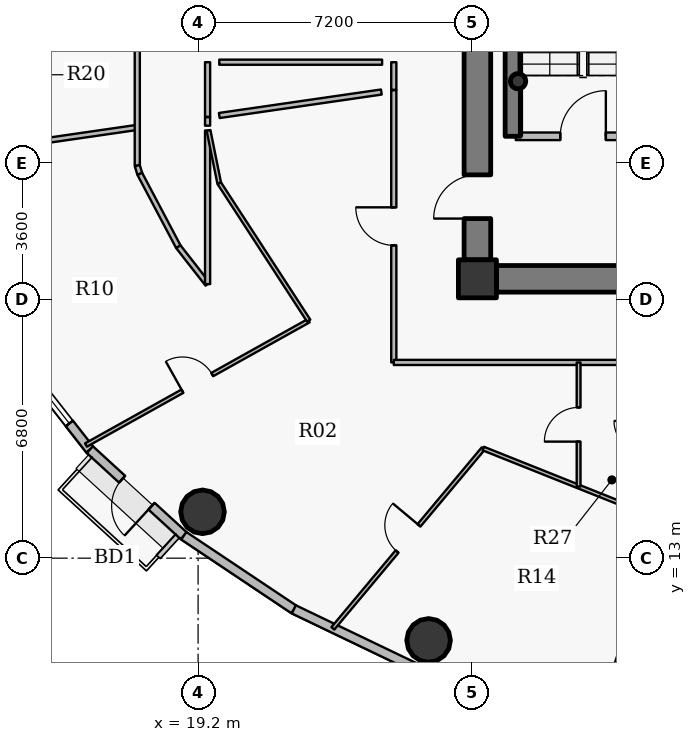
"""IFC4 building model, lengths in metres.
Left out: names, types, materials, properties, quantities, classifications, styles, units other than length and angle.
Written with IfcOpenShell. Run it as: python <this file> out.ifc"""

import sys

from ifc_helpers import new_model, si_unit, direction, frame, frame_2d, origin, origin_2d, place, context, subcontext, project, spatial, rectangle, hollow_circle, extrude, source, transform, mapped, element, fill, save


model = new_model("IFC4")
c1 = context("Model", 3, precision=1e-05, world=origin(), true_north=direction((0.0, 1.0)))
c2 = subcontext(c1, "Body", "Model", "MODEL_VIEW")
j1 = project(units=[si_unit("LENGTHUNIT", "METRE"), si_unit("PLANEANGLEUNIT", "RADIAN")], contexts=[c1])
p1 = place(None, origin())
s1 = spatial("IfcSite", under=j1, at=p1, CompositionType="ELEMENT")
p2 = place(p1, origin())
s2 = spatial("IfcBuilding", under=s1, at=p2, CompositionType="ELEMENT")
p3 = place(p2, frame((0.0, 0.0, 240.3)))
s3 = spatial("IfcBuildingStorey", under=s2, at=p3, CompositionType="ELEMENT", Elevation=240.3)
p4 = place(p3, frame((26.55, 20.35, 0.0), z_axis=(0.0, 0.0, 1.0), x_axis=(1.0, 0.0, 0.0)))
e1 = element("IfcColumn", 1, at=p4, inside=s3, PredefinedType="COLUMN", context=c2, shape_type="SweptSolid", body=[
    extrude(rectangle(XDim=1.0, YDim=1.0, at=origin_2d()), origin(), (0.0, 0.0, 1.0), 3.75),
])
p5 = place(p3, frame((27.48, 24.1, 0.0), z_axis=(0.0, 0.0, 1.0), x_axis=(0.0, 1.0, 0.0)))
e2 = element("IfcWall", 2, at=p5, inside=s3, PredefinedType="SHEAR", context=c2, shape_type="SweptSolid", body=[
    extrude(rectangle(XDim=8.6, YDim=0.4, at=frame_2d((4.3, 0.0))), origin(), (0.0, 0.0, 1.0), 3.75),
])
p6 = place(p3, frame((27.62, 25.55, 0.0), z_axis=(0.0, 0.0, 1.0), x_axis=(1.0, 0.0, 0.0)))
e3 = element("IfcColumn", 3, at=p6, inside=s3, PredefinedType="COLUMN", context=c2, shape_type="SweptSolid", body=[
    extrude(hollow_circle(Radius=0.203, WallThickness=0.016, at=origin_2d()), origin(), (0.0, 0.0, 1.0), 3.75),
])
p7 = place(p3, frame((44.95, 20.35, 0.0), z_axis=(0.0, 0.0, 1.0), x_axis=(-1.0, 0.0, 0.0)))
e4 = element("IfcWall", 4, at=p7, inside=s3, PredefinedType="SHEAR", context=c2, shape_type="SweptSolid", body=[
    extrude(rectangle(XDim=17.9, YDim=0.7, at=frame_2d((8.95, 0.0))), origin(), (0.0, 0.0, 1.0), 3.05),
])
p8 = place(p7, frame((9.7, 0.0, 0.0)))
e5 = element("IfcOpeningElement", 5, at=p8, cuts=e4, PredefinedType="OPENING", context=c2, shape_type="SweptSolid", body=[
    extrude(rectangle(XDim=1.15, YDim=2.15, at=origin_2d()), frame((0.575, 0.36, 1.075), z_axis=(0.0, -1.0, 0.0), x_axis=(1.0, 0.0, 0.0)), (0.0, 0.0, 1.0), 0.72),
])
p9 = place(p3, frame((26.55, 20.85, 0.0), z_axis=(0.0, 0.0, 1.0), x_axis=(0.0, 1.0, 0.0)))
e6 = element("IfcWall", 6, at=p9, inside=s3, PredefinedType="SHEAR", context=c2, shape_type="SweptSolid", body=[
    extrude(rectangle(XDim=12.3, YDim=0.7, at=frame_2d((6.15, 0.0))), origin(), (0.0, 0.0, 1.0), 3.05),
])
p10 = place(p9, frame((1.085, 0.0, 0.0)))
e7 = element("IfcOpeningElement", 7, at=p10, cuts=e6, PredefinedType="OPENING", context=c2, shape_type="SweptSolid", body=[
    extrude(rectangle(XDim=1.15, YDim=2.15, at=origin_2d()), frame((0.575, 0.36, 1.075), z_axis=(0.0, -1.0, 0.0), x_axis=(1.0, 0.0, 0.0)), (0.0, 0.0, 1.0), 0.72),
])
for number, where, z_axis, x_axis in (
    (8, (19.317, 14.219, 0.0), (0.0, 0.0, 1.0), (1.0, 0.0, 0.0)),
    (9, (25.265, 10.836, 0.0), (0.0, 0.0, 1.0), (1.0, 0.0, 0.0)),
):
    element("IfcColumn", number, at=place(p3, frame(where, z_axis=z_axis, x_axis=x_axis)), inside=s3, PredefinedType="COLUMN", context=c2, shape_type="SweptSolid", body=[
        extrude(hollow_circle(Radius=0.575, WallThickness=0.036, at=origin_2d()), origin(), (0.0, 0.0, 1.0), 3.75),
    ])
p11 = place(p3, frame((16.352, 15.855, 0.0), z_axis=(0.0, 0.0, 1.0), x_axis=(-0.616312344705, 0.787501805562, 0.0)))
e10 = element("IfcWall", 10, at=p11, inside=s3, PredefinedType="SOLIDWALL", context=c2, shape_type="SweptSolid", body=[
    extrude(rectangle(XDim=3.225, YDim=0.24, at=frame_2d((1.612, 0.0))), origin(), (0.0, 0.0, 1.0), 3.5),
])
p12 = place(p11, frame((0.876, 0.0, 0.9)))
e11 = element("IfcOpeningElement", 11, at=p12, cuts=e10, PredefinedType="OPENING", context=c2, shape_type="SweptSolid", body=[
    extrude(rectangle(XDim=1.6, YDim=1.75, at=origin_2d()), frame((0.8, 0.13, 0.875), z_axis=(0.0, -1.0, 0.0), x_axis=(1.0, 0.0, 0.0)), (0.0, 0.0, 1.0), 0.26),
])
p13 = place(p3, frame((18.824, 13.589, 0.0), z_axis=(0.0, 0.0, 1.0), x_axis=(-0.737123922599, 0.675757591694, 0.0)))
e12 = element("IfcWall", 12, at=p13, inside=s3, PredefinedType="SOLIDWALL", context=c2, shape_type="SweptSolid", body=[
    extrude(rectangle(XDim=3.354, YDim=0.24, at=frame_2d((1.677, 0.0))), origin(), (0.0, 0.0, 1.0), 3.5),
])
p14 = place(p13, frame((1.152, 0.0, 0.0)))
e13 = element("IfcOpeningElement", 13, at=p14, cuts=e12, PredefinedType="OPENING", context=c2, shape_type="SweptSolid", body=[
    extrude(rectangle(XDim=1.05, YDim=2.15, at=origin_2d()), frame((0.525, 0.13, 1.075), z_axis=(0.0, -1.0, 0.0), x_axis=(1.0, 0.0, 0.0)), (0.0, 0.0, 1.0), 0.26),
])
p15 = place(p3, frame((21.72, 11.652, 0.0), z_axis=(0.0, 0.0, 1.0), x_axis=(-0.831262496074, 0.555880079352, 0.0)))
e14 = element("IfcWall", 14, at=p15, inside=s3, PredefinedType="SOLIDWALL", context=c2, shape_type="SweptSolid", body=[
    extrude(rectangle(XDim=3.484, YDim=0.24, at=frame_2d((1.742, 0.0))), origin(), (0.0, 0.0, 1.0), 3.5),
])
p16 = place(p3, frame((24.969, 10.094, 0.0), z_axis=(0.0, 0.0, 1.0), x_axis=(-0.901598104751, 0.432574684313, 0.0)))
e15 = element("IfcWall", 15, at=p16, inside=s3, PredefinedType="SOLIDWALL", context=c2, shape_type="SweptSolid", body=[
    extrude(rectangle(XDim=3.604, YDim=0.24, at=frame_2d((1.802, 0.0))), origin(), (0.0, 0.0, 1.0), 3.5),
])
p17 = place(p3, frame((12.167, 23.548, 0.0), z_axis=(0.0, 0.0, 1.0), x_axis=(0.989672764262, 0.143345106921, 0.0)))
e16 = element("IfcWall", 16, at=p17, inside=s3, PredefinedType="PARTITIONING", context=c2, shape_type="SweptSolid", body=[
    extrude(rectangle(XDim=5.489, YDim=0.135, at=frame_2d((2.745, 0.0))), origin(), (0.0, 0.0, 1.0), 2.985),
])
p18 = place(p3, frame((16.25, 15.977, 0.0), z_axis=(0.0, 0.0, 1.0), x_axis=(0.87319302211, 0.487374543999, 0.0)))
e17 = element("IfcWall", 17, at=p18, inside=s3, PredefinedType="PARTITIONING", context=c2, shape_type="SweptSolid", body=[
    extrude(rectangle(XDim=6.712, YDim=0.1, at=frame_2d((3.356, 0.0))), origin(), (0.0, 0.0, 1.0), 2.985),
])
p19 = place(p18, frame((2.906, 0.0, 0.0)))
e18 = element("IfcOpeningElement", 18, at=p19, cuts=e17, PredefinedType="OPENING", context=c2, shape_type="SweptSolid", body=[
    extrude(rectangle(XDim=0.9, YDim=2.1, at=origin_2d()), frame((0.45, 0.06, 1.05), z_axis=(0.0, -1.0, 0.0), x_axis=(1.0, 0.0, 0.0)), (0.0, 0.0, 1.0), 0.12),
])
p20 = place(p3, frame((17.6, 23.328, 0.0), z_axis=(0.0, 0.0, 1.0), x_axis=(0.0, 1.0, 0.0)))
e19 = element("IfcWall", 19, at=p20, inside=s3, PredefinedType="PARTITIONING", context=c2, shape_type="SweptSolid", body=[
    extrude(rectangle(XDim=4.622, YDim=0.135, at=frame_2d((2.311, 0.0))), origin(), (0.0, 0.0, 1.0), 2.935),
])
p21 = place(p3, frame((17.6, 23.328, 0.0), z_axis=(0.0, 0.0, 1.0), x_axis=(0.292875000845, -0.956150738053, 0.0)))
e20 = element("IfcWall", 20, at=p21, inside=s3, PredefinedType="PARTITIONING", context=c2, shape_type="SweptSolid", body=[
    extrude(rectangle(XDim=0.227, YDim=0.135, at=frame_2d((0.113, 0.0))), origin(), (0.0, 0.0, 1.0), 3.5),
])
p22 = place(p3, frame((17.667, 23.111, 0.0), z_axis=(0.0, 0.0, 1.0), x_axis=(0.467675622269, -0.883900171024, 0.0)))
e21 = element("IfcWall", 21, at=p22, inside=s3, PredefinedType="PARTITIONING", context=c2, shape_type="SweptSolid", body=[
    extrude(rectangle(XDim=2.168, YDim=0.135, at=frame_2d((1.084, 0.0))), origin(), (0.0, 0.0, 1.0), 2.935),
])
p23 = place(p3, frame((18.681, 21.194, 0.0), z_axis=(0.0, 0.0, 1.0), x_axis=(0.616239706802, -0.787558647823, 0.0)))
e22 = element("IfcWall", 22, at=p23, inside=s3, PredefinedType="PARTITIONING", context=c2, shape_type="SweptSolid", body=[
    extrude(rectangle(XDim=1.248, YDim=0.135, at=frame_2d((0.624, 0.0))), origin(), (0.0, 0.0, 1.0), 3.5),
])
p24 = place(p3, frame((19.45, 20.211, 0.0), z_axis=(0.0, 0.0, 1.0), x_axis=(0.0, 1.0, 0.0)))
e23 = element("IfcWall", 23, at=p24, inside=s3, PredefinedType="PARTITIONING", context=c2, shape_type="SweptSolid", body=[
    extrude(rectangle(XDim=4.042, YDim=0.135, at=frame_2d((2.021, 0.0))), origin(), (0.0, 0.0, 1.0), 2.935),
])
p25 = place(p3, frame((19.45, 24.38, 0.0), z_axis=(0.0, 0.0, 1.0), x_axis=(0.0, 1.0, 0.0)))
e24 = element("IfcWall", 24, at=p25, inside=s3, PredefinedType="PARTITIONING", context=c2, shape_type="SweptSolid", body=[
    extrude(rectangle(XDim=0.223, YDim=0.135, at=frame_2d((0.111, 0.0))), origin(), (0.0, 0.0, 1.0), 3.5),
])
p26 = place(p3, frame((19.475, 24.256, 0.0), z_axis=(0.0, 0.0, 1.0), x_axis=(0.198203790622, -0.980160832406, 0.0)))
e25 = element("IfcWall", 25, at=p26, inside=s3, PredefinedType="PARTITIONING", context=c2, shape_type="SweptSolid", body=[
    extrude(rectangle(XDim=1.417, YDim=0.1, at=frame_2d((0.708, 0.0))), origin(), (0.0, 0.0, 1.0), 2.935),
])
p27 = place(p3, frame((19.756, 22.867, 0.0), z_axis=(0.0, 0.0, 1.0), x_axis=(0.545441385955, -0.83814896915, 0.0)))
e26 = element("IfcWall", 26, at=p27, inside=s3, PredefinedType="PARTITIONING", context=c2, shape_type="SweptSolid", body=[
    extrude(rectangle(XDim=4.318, YDim=0.1, at=frame_2d((2.159, 0.0))), origin(), (0.0, 0.0, 1.0), 2.935),
])
p28 = place(p3, frame((22.747, 11.154, 0.0), z_axis=(0.0, 0.0, 1.0), x_axis=(0.641565789242, 0.767068013982, 0.0)))
e27 = element("IfcWall", 27, at=p28, inside=s3, PredefinedType="PARTITIONING", context=c2, shape_type="SweptSolid", body=[
    extrude(rectangle(XDim=6.167, YDim=0.1, at=frame_2d((3.083, 0.0))), origin(), (0.0, 0.0, 1.0), 2.985),
])
p29 = place(p28, frame((2.633, 0.0, 0.0)))
e28 = element("IfcOpeningElement", 28, at=p29, cuts=e27, PredefinedType="OPENING", context=c2, shape_type="SweptSolid", body=[
    extrude(rectangle(XDim=0.9, YDim=2.1, at=origin_2d()), frame((0.45, 0.06, 1.05), z_axis=(0.0, -1.0, 0.0), x_axis=(1.0, 0.0, 0.0)), (0.0, 0.0, 1.0), 0.12),
])
p30 = place(p3, frame((24.35, 18.15, 0.0), z_axis=(0.0, 0.0, 1.0), x_axis=(0.0, 1.0, 0.0)))
e29 = element("IfcWall", 29, at=p30, inside=s3, PredefinedType="PARTITIONING", context=c2, shape_type="SweptSolid", body=[
    extrude(rectangle(XDim=7.163, YDim=0.135, at=frame_2d((3.581, 0.0))), origin(), (0.0, 0.0, 1.0), 2.935),
])
p31 = place(p30, frame((3.081, 0.0, 0.0)))
e30 = element("IfcOpeningElement", 30, at=p31, cuts=e29, PredefinedType="OPENING", context=c2, shape_type="SweptSolid", body=[
    extrude(rectangle(XDim=1.0, YDim=2.15, at=origin_2d()), frame((0.5, 0.078, 1.075), z_axis=(0.0, -1.0, 0.0), x_axis=(1.0, 0.0, 0.0)), (0.0, 0.0, 1.0), 0.155),
])
p32 = place(p3, frame((24.35, 18.15, 0.0), z_axis=(0.0, 0.0, 1.0), x_axis=(1.0, 0.0, 0.0)))
e31 = element("IfcWall", 31, at=p32, inside=s3, PredefinedType="PARTITIONING", context=c2, shape_type="SweptSolid", body=[
    extrude(rectangle(XDim=23.85, YDim=0.135, at=frame_2d((11.925, 0.0))), origin(), (0.0, 0.0, 1.0), 2.935),
])
p33 = place(p32, frame((14.838, 0.0, 0.0)))
e32 = element("IfcOpeningElement", 32, at=p33, cuts=e31, PredefinedType="OPENING", context=c2, shape_type="SweptSolid", body=[
    extrude(rectangle(XDim=1.0, YDim=2.15, at=origin_2d()), frame((0.5, 0.078, 1.075), z_axis=(0.0, -1.0, 0.0), x_axis=(1.0, 0.0, 0.0)), (0.0, 0.0, 1.0), 0.155),
])
p34 = place(p32, frame((21.472, 0.0, 0.0)))
e33 = element("IfcOpeningElement", 33, at=p34, cuts=e31, PredefinedType="OPENING", context=c2, shape_type="SweptSolid", body=[
    extrude(rectangle(XDim=1.0, YDim=2.15, at=origin_2d()), frame((0.5, 0.078, 1.075), z_axis=(0.0, -1.0, 0.0), x_axis=(1.0, 0.0, 0.0)), (0.0, 0.0, 1.0), 0.155),
])
p35 = place(p3, frame((26.703, 15.884, 0.0), z_axis=(0.0, 0.0, 1.0), x_axis=(0.928807108231, -0.370563564991, 0.0)))
e34 = element("IfcWall", 34, at=p35, inside=s3, PredefinedType="PARTITIONING", context=c2, shape_type="SweptSolid", body=[
    extrude(rectangle(XDim=4.327, YDim=0.1, at=frame_2d((2.163, 0.0))), origin(), (0.0, 0.0, 1.0), 2.935),
])
p36 = place(p3, frame((27.56, 24.1, 0.0), z_axis=(0.0, 0.0, 1.0), x_axis=(1.0, 0.0, 0.0)))
e35 = element("IfcWall", 35, at=p36, inside=s3, PredefinedType="PARTITIONING", context=c2, shape_type="SweptSolid", body=[
    extrude(rectangle(XDim=3.54, YDim=0.2, at=frame_2d((1.77, 0.0))), origin(), (0.0, 0.0, 1.0), 3.5),
])
p37 = place(p36, frame((1.17, 0.0, 0.0)))
e36 = element("IfcOpeningElement", 36, at=p37, cuts=e35, PredefinedType="OPENING", context=c2, shape_type="SweptSolid", body=[
    extrude(rectangle(XDim=1.2, YDim=2.15, at=origin_2d()), frame((0.6, 0.11, 1.075), z_axis=(0.0, -1.0, 0.0), x_axis=(1.0, 0.0, 0.0)), (0.0, 0.0, 1.0), 0.22),
])
p38 = place(p3, frame((29.213, 14.883, 0.0), z_axis=(0.0, 0.0, 1.0), x_axis=(0.0, 1.0, 0.0)))
e37 = element("IfcWall", 37, at=p38, inside=s3, PredefinedType="PARTITIONING", context=c2, shape_type="SweptSolid", body=[
    extrude(rectangle(XDim=3.267, YDim=0.1, at=frame_2d((1.633, 0.0))), origin(), (0.0, 0.0, 1.0), 2.935),
])
p39 = place(p38, frame((1.183, 0.0, 0.0)))
e38 = element("IfcOpeningElement", 38, at=p39, cuts=e37, PredefinedType="OPENING", context=c2, shape_type="SweptSolid", body=[
    extrude(rectangle(XDim=0.9, YDim=2.1, at=origin_2d()), frame((0.45, 0.06, 1.05), z_axis=(0.0, -1.0, 0.0), x_axis=(1.0, 0.0, 0.0)), (0.0, 0.0, 1.0), 0.12),
])
p40 = place(p3, frame((29.711, 8.717, 0.0), z_axis=(0.0, 0.0, 1.0), x_axis=(0.325280852175, 0.945617452889, 0.0)))
e39 = element("IfcWall", 39, at=p40, inside=s3, PredefinedType="PARTITIONING", context=c2, shape_type="SweptSolid", body=[
    extrude(rectangle(XDim=9.976, YDim=0.135, at=frame_2d((4.988, 0.0))), origin(), (0.0, 0.0, 1.0), 2.985),
])
p41 = place(p3, frame((19.45, 26.05, 0.0), z_axis=(0.0, 0.0, 1.0), x_axis=(0.0, -1.0, 0.0)))
e40 = element("IfcWall", 40, at=p41, inside=s3, PredefinedType="PARTITIONING", context=c2, shape_type="SweptSolid", body=[
    extrude(rectangle(XDim=1.437, YDim=0.135, at=frame_2d((0.719, 0.0))), origin(), (0.0, 0.0, 1.0), 3.5),
])
p42 = place(p3, frame((26.2, 20.84, 0.0), z_axis=(0.0, 0.0, 1.0), x_axis=(0.0, -1.0, 0.0)))
e41 = element("IfcWall", 41, at=p42, inside=s3, PredefinedType="PARTITIONING", context=c2, shape_type="SweptSolid", body=[
    extrude(rectangle(XDim=0.84, YDim=0.135, at=frame_2d((0.42, 0.0))), origin(), (0.0, 0.0, 1.0), 3.5),
])
p43 = place(p3, frame((26.508, 20.0, 0.0), z_axis=(0.0, 0.0, 1.0), x_axis=(1.0, 0.0, 0.0)))
e42 = element("IfcWall", 42, at=p43, inside=s3, PredefinedType="PARTITIONING", context=c2, shape_type="SweptSolid", body=[
    extrude(rectangle(XDim=0.532, YDim=0.135, at=frame_2d((0.266, 0.0))), origin(), (0.0, 0.0, 1.0), 2.935),
])
p44 = place(p3, frame((24.35, 25.323, 0.0), z_axis=(0.0, 0.0, 1.0), x_axis=(0.0, 1.0, 0.0)))
e43 = element("IfcWall", 43, at=p44, inside=s3, PredefinedType="PARTITIONING", context=c2, shape_type="SweptSolid", body=[
    extrude(rectangle(XDim=0.728, YDim=0.135, at=frame_2d((0.364, 0.0))), origin(), (0.0, 0.0, 1.0), 3.5),
])
p45 = place(p3, frame((24.042, 26.05, 0.0), z_axis=(0.0, 0.0, 1.0), x_axis=(-1.0, 0.0, 0.0)))
e44 = element("IfcWall", 44, at=p45, inside=s3, PredefinedType="PARTITIONING", context=c2, shape_type="SweptSolid", body=[
    extrude(rectangle(XDim=4.285, YDim=0.135, at=frame_2d((2.143, 0.0))), origin(), (0.0, 0.0, 1.0), 3.5),
])
p46 = place(p3, frame((19.758, 24.647, 0.0), z_axis=(0.0, 0.0, 1.0), x_axis=(0.989666541967, 0.143388059861, 0.0)))
e45 = element("IfcWall", 45, at=p46, inside=s3, PredefinedType="PARTITIONING", context=c2, shape_type="SweptSolid", body=[
    extrude(rectangle(XDim=4.309, YDim=0.135, at=frame_2d((2.155, 0.0))), origin(), (0.0, 0.0, 1.0), 3.5),
])
m1 = source(origin(), c2, "Body", "SweptSolid", [
    extrude(rectangle(XDim=1.6, YDim=1.75, at=origin_2d()), frame((0.8, 0.03, 0.875), z_axis=(0.0, -1.0, 0.0), x_axis=(1.0, 0.0, 0.0)), (0.0, 0.0, 1.0), 0.06),
])
p47 = place(p12, origin())
e46 = element("IfcWindow", 46, at=p47, inside=s3, PartitioningType="DOUBLE_PANEL_VERTICAL", PredefinedType="WINDOW", context=c2, shape_type="MappedRepresentation", body=[
    mapped(m1, transform((0.0, 0.0, 0.0), x_axis=(1.0, 0.0, 0.0), y_axis=(0.0, 1.0, 0.0), z_axis=(0.0, 0.0, 1.0), scale=1.0)),
])
fill(e11, e46)
m2 = source(origin(), c2, "Body", "SweptSolid", [
    extrude(rectangle(XDim=1.05, YDim=2.15, at=origin_2d()), frame((0.525, 0.025, 1.075), z_axis=(0.0, -1.0, 0.0), x_axis=(1.0, 0.0, 0.0)), (0.0, 0.0, 1.0), 0.05),
])
p48 = place(p14, origin())
e47 = element("IfcDoor", 47, at=p48, inside=s3, OperationType="SINGLE_SWING_LEFT", PredefinedType="DOOR", context=c2, shape_type="MappedRepresentation", body=[
    mapped(m2, transform((0.0, 0.0, 0.0), x_axis=(1.0, 0.0, 0.0), y_axis=(0.0, 1.0, 0.0), z_axis=(0.0, 0.0, 1.0), scale=1.0)),
])
fill(e13, e47)
m3 = source(origin(), c2, "Body", "SweptSolid", [
    extrude(rectangle(XDim=1.15, YDim=2.15, at=origin_2d()), frame((0.575, 0.025, 1.075), z_axis=(0.0, -1.0, 0.0), x_axis=(1.0, 0.0, 0.0)), (0.0, 0.0, 1.0), 0.05),
])
p49 = place(p10, origin())
e48 = element("IfcDoor", 48, at=p49, inside=s3, OperationType="SINGLE_SWING_LEFT", PredefinedType="DOOR", context=c2, shape_type="MappedRepresentation", body=[
    mapped(m3, transform((0.0, 0.0, 0.0), x_axis=(1.0, 0.0, 0.0), y_axis=(0.0, 1.0, 0.0), z_axis=(0.0, 0.0, 1.0), scale=1.0)),
])
fill(e7, e48)
m4 = source(origin(), c2, "Body", "SweptSolid", [
    extrude(rectangle(XDim=1.2, YDim=2.15, at=origin_2d()), frame((0.6, 0.025, 1.075), z_axis=(0.0, -1.0, 0.0), x_axis=(1.0, 0.0, 0.0)), (0.0, 0.0, 1.0), 0.05),
])
p50 = place(p37, origin())
e49 = element("IfcDoor", 49, at=p50, inside=s3, OperationType="SINGLE_SWING_RIGHT", PredefinedType="DOOR", context=c2, shape_type="MappedRepresentation", body=[
    mapped(m4, transform((0.0, 0.0, 0.0), x_axis=(1.0, 0.0, 0.0), y_axis=(0.0, 1.0, 0.0), z_axis=(0.0, 0.0, 1.0), scale=1.0)),
])
fill(e36, e49)
m5 = source(origin(), c2, "Body", "SweptSolid", [
    extrude(rectangle(XDim=1.0, YDim=2.15, at=origin_2d()), frame((0.5, 0.025, 1.075), z_axis=(0.0, -1.0, 0.0), x_axis=(1.0, 0.0, 0.0)), (0.0, 0.0, 1.0), 0.05),
])
p51 = place(p31, origin())
e50 = element("IfcDoor", 50, at=p51, inside=s3, OperationType="SINGLE_SWING_RIGHT", PredefinedType="DOOR", context=c2, shape_type="MappedRepresentation", body=[
    mapped(m5, transform((0.0, 0.0, 0.0), x_axis=(1.0, 0.0, 0.0), y_axis=(0.0, 1.0, 0.0), z_axis=(0.0, 0.0, 1.0), scale=1.0)),
])
fill(e30, e50)
m6 = source(origin(), c2, "Body", "SweptSolid", [
    extrude(rectangle(XDim=0.9, YDim=2.1, at=origin_2d()), frame((0.45, 0.025, 1.05), z_axis=(0.0, -1.0, 0.0), x_axis=(1.0, 0.0, 0.0)), (0.0, 0.0, 1.0), 0.05),
])
p52 = place(p19, origin())
e51 = element("IfcDoor", 51, at=p52, inside=s3, OperationType="SINGLE_SWING_LEFT", PredefinedType="DOOR", context=c2, shape_type="MappedRepresentation", body=[
    mapped(m6, transform((0.0, 0.0, 0.0), x_axis=(1.0, 0.0, 0.0), y_axis=(0.0, 1.0, 0.0), z_axis=(0.0, 0.0, 1.0), scale=1.0)),
])
fill(e18, e51)
p53 = place(p29, origin())
e52 = element("IfcDoor", 52, at=p53, inside=s3, OperationType="SINGLE_SWING_RIGHT", PredefinedType="DOOR", context=c2, shape_type="MappedRepresentation", body=[
    mapped(m6, transform((0.0, 0.0, 0.0), x_axis=(1.0, 0.0, 0.0), y_axis=(0.0, 1.0, 0.0), z_axis=(0.0, 0.0, 1.0), scale=1.0)),
])
fill(e28, e52)
p54 = place(p39, origin())
e53 = element("IfcDoor", 53, at=p54, inside=s3, OperationType="SINGLE_SWING_LEFT", PredefinedType="DOOR", context=c2, shape_type="MappedRepresentation", body=[
    mapped(m6, transform((0.0, 0.0, 0.0), x_axis=(1.0, 0.0, 0.0), y_axis=(0.0, 1.0, 0.0), z_axis=(0.0, 0.0, 1.0), scale=1.0)),
])
fill(e38, e53)
save(model, sys.argv[1])
